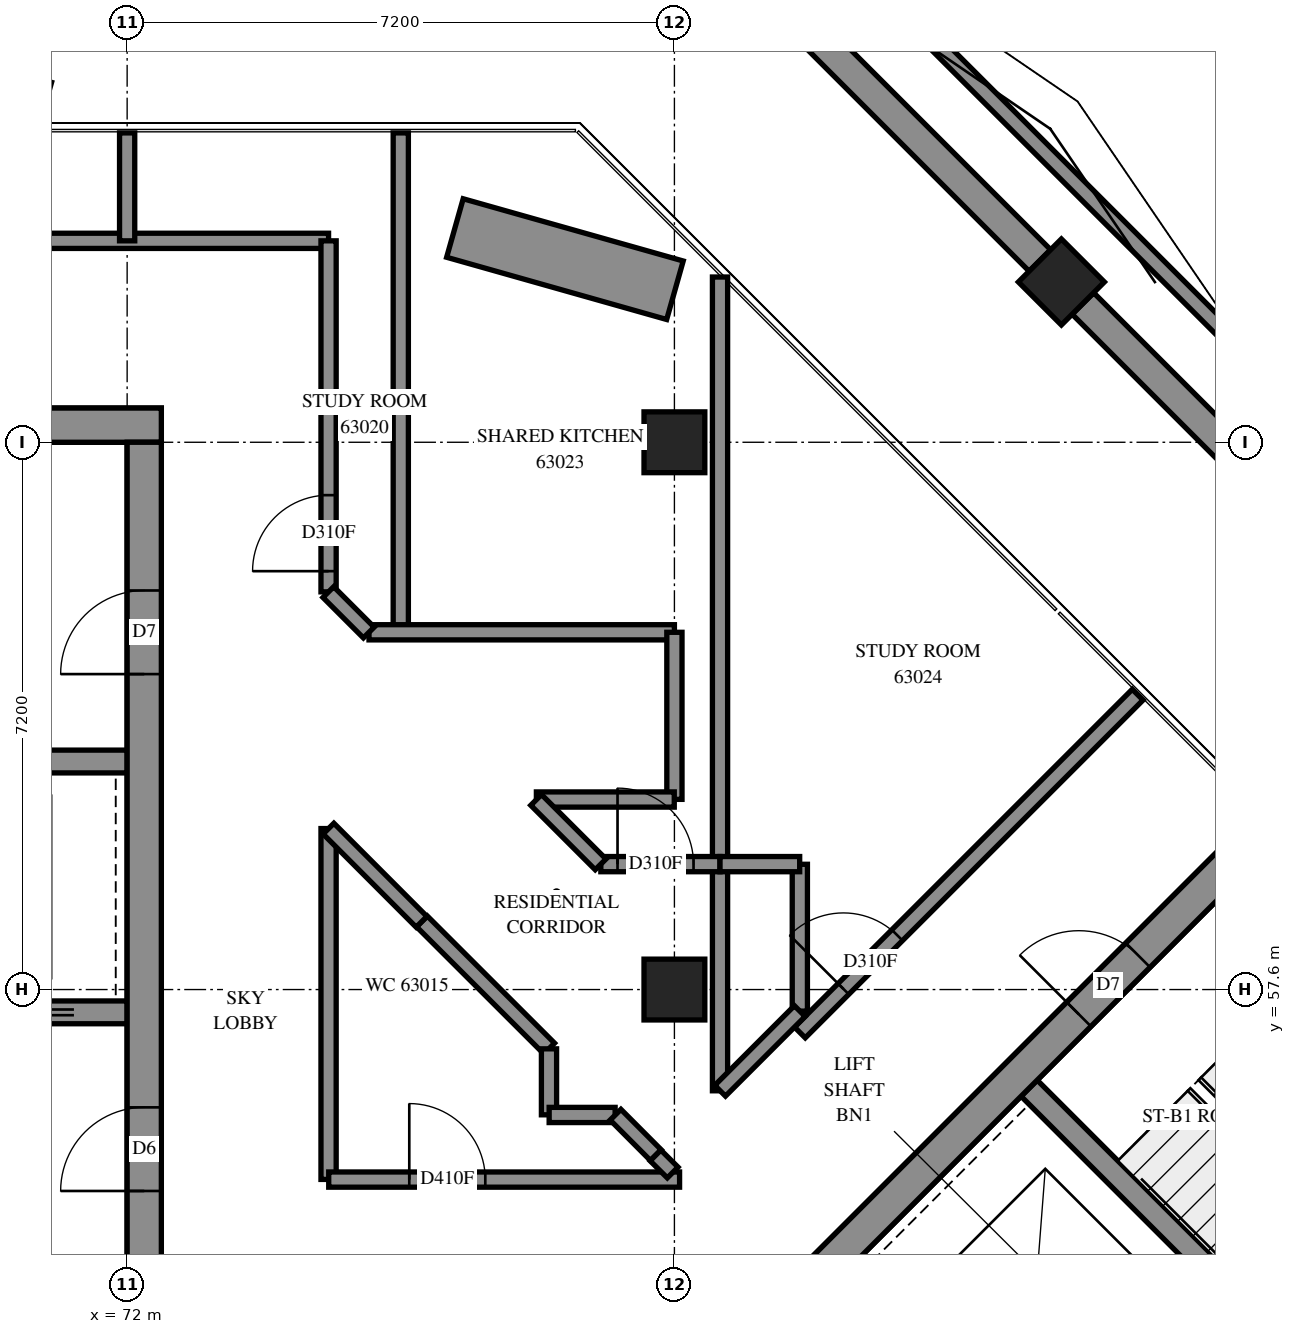
"""IFC4 building model, lengths in metres.
Left out: names, types, materials, properties, quantities, classifications, styles, units other than length and angle.
Written with IfcOpenShell. Run it as: python <this file> out.ifc"""

import sys

from ifc_helpers import new_model, si_unit, direction, frame, frame_2d, origin, origin_2d, place, context, subcontext, project, spatial, polyline, rectangle, outline, extrude, element, fill, save


model = new_model("IFC4")
c1 = context("Model", 3, precision=1e-05, world=origin(), true_north=direction((0.0, 1.0)))
c2 = subcontext(c1, "Body", "Model", "MODEL_VIEW")
j1 = project(units=[si_unit("LENGTHUNIT", "METRE"), si_unit("PLANEANGLEUNIT", "RADIAN")], contexts=[c1])
p1 = place(None, origin())
s1 = spatial("IfcSite", under=j1, at=p1, CompositionType="ELEMENT")
p2 = place(p1, origin())
s2 = spatial("IfcBuilding", under=s1, at=p2, CompositionType="ELEMENT")
p3 = place(p2, frame((0.0, 0.0, 230.4)))
s3 = spatial("IfcBuildingStorey", under=s2, at=p3, CompositionType="ELEMENT", Elevation=230.4)
for number, where, z_axis, x_axis in (
    (1, (79.2, 57.6, 0.0), (0.0, 0.0, 1.0), (1.0, 0.0, 0.0)),
    (2, (79.2, 64.8, 0.0), (0.0, 0.0, 1.0), (1.0, 0.0, 0.0)),
    (3, (84.291, 66.909, 0.0), (0.0, 0.0, 1.0), (0.707, -0.707, 0.0)),
):
    element("IfcColumn", number, at=place(p3, frame(where, z_axis=z_axis, x_axis=x_axis)), inside=s3, PredefinedType="COLUMN", context=c2, shape_type="SweptSolid", body=[
        extrude(rectangle(XDim=0.8, YDim=0.8, at=origin_2d()), origin(), (0.0, 0.0, 1.0), 3.9),
    ])
p4 = place(p3, frame((57.15, 65.025, -0.3), z_axis=(0.0, 0.0, 1.0), x_axis=(1.0, 0.0, 0.0)))
e4 = element("IfcWall", 4, at=p4, inside=s3, PredefinedType="SHEAR", context=c2, shape_type="SweptSolid", body=[
    extrude(rectangle(XDim=15.3, YDim=0.45, at=frame_2d((7.65, 0.0))), origin(), (0.0, 0.0, 1.0), 3.5),
])
p5 = place(p4, frame((10.45, 0.0, 0.3)))
e5 = element("IfcOpeningElement", 5, at=p5, cuts=e4, PredefinedType="OPENING", context=c2, shape_type="SweptSolid", body=[
    extrude(rectangle(XDim=0.8, YDim=2.1, at=frame_2d((0.4, 1.05))), frame((0.0, 0.235, 0.0), z_axis=(0.0, -1.0, 0.0), x_axis=(1.0, 0.0, 0.0)), (0.0, 0.0, 1.0), 0.47),
])
p6 = place(p3, frame((72.225, 50.4, -0.3), z_axis=(0.0, 0.0, 1.0), x_axis=(0.0, 1.0, 0.0)))
e6 = element("IfcWall", 6, at=p6, inside=s3, PredefinedType="SHEAR", context=c2, shape_type="SweptSolid", body=[
    extrude(rectangle(XDim=14.4, YDim=0.45, at=frame_2d((7.2, 0.0))), origin(), (0.0, 0.0, 1.0), 3.5),
])
p7 = place(p6, frame((4.55, 0.0, 0.3)))
e7 = element("IfcOpeningElement", 7, at=p7, cuts=e6, PredefinedType="OPENING", context=c2, shape_type="SweptSolid", body=[
    extrude(rectangle(XDim=1.1, YDim=2.1, at=frame_2d((0.55, 1.05))), frame((0.0, 0.235, 0.0), z_axis=(0.0, -1.0, 0.0), x_axis=(1.0, 0.0, 0.0)), (0.0, 0.0, 1.0), 0.47),
])
p8 = place(p6, frame((11.35, 0.0, 0.3)))
e8 = element("IfcOpeningElement", 8, at=p8, cuts=e6, PredefinedType="OPENING", context=c2, shape_type="SweptSolid", body=[
    extrude(rectangle(XDim=1.1, YDim=2.1, at=frame_2d((0.55, 1.05))), frame((0.0, 0.235, 0.0), z_axis=(0.0, -1.0, 0.0), x_axis=(1.0, 0.0, 0.0)), (0.0, 0.0, 1.0), 0.47),
])
p9 = place(p3, frame((57.6, 57.3, 0.0), z_axis=(0.0, 0.0, 1.0), x_axis=(1.0, 0.0, 0.0)))
e9 = element("IfcWall", 9, at=p9, inside=s3, PredefinedType="SOLIDWALL", context=c2, shape_type="SweptSolid", body=[
    extrude(rectangle(XDim=14.4, YDim=0.3, at=frame_2d((7.2, 0.0))), origin(), (0.0, 0.0, 1.0), 3.9),
])
p10 = place(p9, frame((1.25, 0.0, 0.0)))
e10 = element("IfcOpeningElement", 10, at=p10, cuts=e9, PredefinedType="OPENING", context=c2, shape_type="SweptSolid", body=[
    extrude(rectangle(XDim=1.1, YDim=2.1, at=frame_2d((0.55, 1.05))), frame((0.0, 0.16, 0.0), z_axis=(0.0, -1.0, 0.0), x_axis=(1.0, 0.0, 0.0)), (0.0, 0.0, 1.0), 0.32),
])
p11 = place(p9, frame((4.85, 0.0, 0.0)))
e11 = element("IfcOpeningElement", 11, at=p11, cuts=e9, PredefinedType="OPENING", context=c2, shape_type="SweptSolid", body=[
    extrude(rectangle(XDim=1.1, YDim=2.1, at=frame_2d((0.55, 1.05))), frame((0.0, 0.16, 0.0), z_axis=(0.0, -1.0, 0.0), x_axis=(1.0, 0.0, 0.0)), (0.0, 0.0, 1.0), 0.32),
])
p12 = place(p9, frame((8.45, 0.0, 0.0)))
e12 = element("IfcOpeningElement", 12, at=p12, cuts=e9, PredefinedType="OPENING", context=c2, shape_type="SweptSolid", body=[
    extrude(rectangle(XDim=1.1, YDim=2.1, at=frame_2d((0.55, 1.05))), frame((0.0, 0.16, 0.0), z_axis=(0.0, -1.0, 0.0), x_axis=(1.0, 0.0, 0.0)), (0.0, 0.0, 1.0), 0.32),
])
p13 = place(p9, frame((12.05, 0.0, 0.0)))
e13 = element("IfcOpeningElement", 13, at=p13, cuts=e9, PredefinedType="OPENING", context=c2, shape_type="SweptSolid", body=[
    extrude(rectangle(XDim=1.1, YDim=2.1, at=frame_2d((0.55, 1.05))), frame((0.0, 0.16, 0.0), z_axis=(0.0, -1.0, 0.0), x_axis=(1.0, 0.0, 0.0)), (0.0, 0.0, 1.0), 0.32),
])
p14 = place(p3, frame((64.8, 60.6, 0.0), z_axis=(0.0, 0.0, 1.0), x_axis=(1.0, 0.0, 0.0)))
e14 = element("IfcWall", 14, at=p14, inside=s3, PredefinedType="SOLIDWALL", context=c2, shape_type="SweptSolid", body=[
    extrude(rectangle(XDim=7.2, YDim=0.3, at=frame_2d((3.6, 0.0))), origin(), (0.0, 0.0, 1.0), 3.9),
])
p15 = place(p3, frame((76.495, 49.249, -0.3), z_axis=(0.0, 0.0, 1.0), x_axis=(0.7071067812, 0.7071067812, 0.0)))
e15 = element("IfcWall", 15, at=p15, inside=s3, PredefinedType="SHEAR", context=c2, shape_type="SweptSolid", body=[
    extrude(rectangle(XDim=14.4, YDim=0.45, at=frame_2d((7.2, 0.0))), origin(), (0.0, 0.0, 1.0), 3.5),
])
p16 = place(p15, frame((4.55, 0.0, 0.3)))
e16 = element("IfcOpeningElement", 16, at=p16, cuts=e15, PredefinedType="OPENING", context=c2, shape_type="SweptSolid", body=[
    extrude(rectangle(XDim=1.1, YDim=2.1, at=frame_2d((0.55, 1.05))), frame((0.0, 0.235, 0.0), z_axis=(0.0, -1.0, 0.0), x_axis=(1.0, 0.0, 0.0)), (0.0, 0.0, 1.0), 0.47),
])
p17 = place(p15, frame((11.35, 0.0, 0.3)))
e17 = element("IfcOpeningElement", 17, at=p17, cuts=e15, PredefinedType="OPENING", context=c2, shape_type="SweptSolid", body=[
    extrude(rectangle(XDim=1.1, YDim=2.1, at=frame_2d((0.55, 1.05))), frame((0.0, 0.235, 0.0), z_axis=(0.0, -1.0, 0.0), x_axis=(1.0, 0.0, 0.0)), (0.0, 0.0, 1.0), 0.47),
])
p18 = place(p3, frame((83.867, 56.302, 0.0), z_axis=(0.0, 0.0, 1.0), x_axis=(0.7071137256, -0.7070998367, 0.0)))
e18 = element("IfcWall", 18, at=p18, inside=s3, PredefinedType="SOLIDWALL", context=c2, shape_type="SweptSolid", body=[
    extrude(rectangle(XDim=7.2, YDim=0.3, at=frame_2d((3.6, 0.0))), origin(), (0.0, 0.0, 1.0), 3.9),
])
p19 = place(p3, frame((79.207, 66.8, 0.0), z_axis=(0.0, 0.0, 1.0), x_axis=(-0.9622630537, 0.2721209575, 0.0)))
e19 = element("IfcWall", 19, at=p19, inside=s3, PredefinedType="SOLIDWALL", context=c2, shape_type="SweptSolid", body=[
    extrude(rectangle(XDim=3.008, YDim=0.8, at=frame_2d((1.504, 0.0))), origin(), (0.0, 0.0, 1.0), 0.65),
])
p20 = place(p3, frame((102.747, 49.938, 0.0), z_axis=(0.0, 0.0, 1.0), x_axis=(-0.7071083109, 0.7071052514, 0.0)))
e20 = element("IfcWall", 20, at=p20, inside=s3, PredefinedType="SOLIDWALL", context=c2, shape_type="SweptSolid", body=[
    extrude(outline(polyline([(-0.1, -0.1), (32.726, -0.1), (32.644, 0.1), (0.1, 0.1), (-0.1, -0.1)])), origin(), (0.0, 0.0, 1.0), 4.2),
])
p21 = place(p3, frame((54.95, 67.45, 0.0), z_axis=(0.0, 0.0, 1.0), x_axis=(1.0, 0.0, 0.0)))
e21 = element("IfcWall", 21, at=p21, inside=s3, PredefinedType="PARTITIONING", context=c2, shape_type="SweptSolid", body=[
    extrude(rectangle(XDim=19.7, YDim=0.2, at=frame_2d((9.85, 0.0))), origin(), (0.0, 0.0, 1.0), 3.9),
])
p22 = place(p21, frame((6.513, 0.0, 0.0)))
e22 = element("IfcOpeningElement", 22, at=p22, cuts=e21, PredefinedType="OPENING", context=c2, shape_type="SweptSolid", body=[
    extrude(rectangle(XDim=1.0, YDim=2.1, at=frame_2d((0.5, 1.05))), frame((0.0, 0.11, 0.0), z_axis=(0.0, -1.0, 0.0), x_axis=(1.0, 0.0, 0.0)), (0.0, 0.0, 1.0), 0.22),
])
p23 = place(p21, frame((13.713, 0.0, 0.0)))
e23 = element("IfcOpeningElement", 23, at=p23, cuts=e21, PredefinedType="OPENING", context=c2, shape_type="SweptSolid", body=[
    extrude(rectangle(XDim=1.0, YDim=2.1, at=frame_2d((0.5, 1.05))), frame((0.0, 0.11, 0.0), z_axis=(0.0, -1.0, 0.0), x_axis=(1.0, 0.0, 0.0)), (0.0, 0.0, 1.0), 0.22),
])
p24 = place(p3, frame((79.8, 59.25, 0.0), z_axis=(0.0, 0.0, 1.0), x_axis=(0.0, 1.0, 0.0)))
e24 = element("IfcWall", 24, at=p24, inside=s3, PredefinedType="PARTITIONING", context=c2, shape_type="SweptSolid", body=[
    extrude(rectangle(XDim=7.724, YDim=0.2, at=frame_2d((3.862, 0.0))), origin(), (0.0, 0.0, 1.0), 3.9),
])
p25 = place(p3, frame((75.6, 62.3, 0.0), z_axis=(0.0, 0.0, 1.0), x_axis=(0.0, 1.0, 0.0)))
e25 = element("IfcWall", 25, at=p25, inside=s3, PredefinedType="PARTITIONING", context=c2, shape_type="SweptSolid", body=[
    extrude(rectangle(XDim=6.57, YDim=0.2, at=frame_2d((3.285, 0.0))), origin(), (0.0, 0.0, 1.0), 3.9),
])
p26 = place(p3, frame((80.851, 57.035, 0.0), z_axis=(0.0, 0.0, 1.0), x_axis=(0.7071067812, 0.7071067812, 0.0)))
e26 = element("IfcWall", 26, at=p26, inside=s3, PredefinedType="PARTITIONING", context=c2, shape_type="SweptSolid", body=[
    extrude(rectangle(XDim=6.285, YDim=0.2, at=frame_2d((3.142, 0.0))), origin(), (0.0, 0.0, 1.0), 3.9),
])
p27 = place(p26, frame((0.81, 0.0, 0.0)))
e27 = element("IfcOpeningElement", 27, at=p27, cuts=e26, PredefinedType="OPENING", context=c2, shape_type="SweptSolid", body=[
    extrude(rectangle(XDim=1.0, YDim=2.1, at=frame_2d((0.5, 1.05))), frame((0.0, 0.11, 0.0), z_axis=(0.0, -1.0, 0.0), x_axis=(1.0, 0.0, 0.0)), (0.0, 0.0, 1.0), 0.22),
])
p28 = place(p3, frame((74.65, 62.832, 0.0), z_axis=(0.0, 0.0, 1.0), x_axis=(0.0, 1.0, 0.0)))
e28 = element("IfcWall", 28, at=p28, inside=s3, PredefinedType="PARTITIONING", context=c2, shape_type="SweptSolid", body=[
    extrude(rectangle(XDim=4.618, YDim=0.2, at=frame_2d((2.309, 0.0))), origin(), (0.0, 0.0, 1.0), 3.9),
])
p29 = place(p28, frame((0.272, 0.0, 0.0)))
e29 = element("IfcOpeningElement", 29, at=p29, cuts=e28, PredefinedType="OPENING", context=c2, shape_type="SweptSolid", body=[
    extrude(rectangle(XDim=1.0, YDim=2.1, at=frame_2d((0.5, 1.05))), frame((0.0, 0.11, 0.0), z_axis=(0.0, -1.0, 0.0), x_axis=(1.0, 0.0, 0.0)), (0.0, 0.0, 1.0), 0.22),
])
p30 = place(p3, frame((74.65, 55.102, 0.0), z_axis=(0.0, 0.0, 1.0), x_axis=(0.0, 1.0, 0.0)))
e30 = element("IfcWall", 30, at=p30, inside=s3, PredefinedType="PARTITIONING", context=c2, shape_type="SweptSolid", body=[
    extrude(rectangle(XDim=4.616, YDim=0.2, at=frame_2d((2.308, 0.0))), origin(), (0.0, 0.0, 1.0), 3.9),
])
p31 = place(p3, frame((74.652, 55.1, 0.0), z_axis=(0.0, 0.0, 1.0), x_axis=(1.0, 0.0, 0.0)))
e31 = element("IfcWall", 31, at=p31, inside=s3, PredefinedType="PARTITIONING", context=c2, shape_type="SweptSolid", body=[
    extrude(rectangle(XDim=4.616, YDim=0.2, at=frame_2d((2.308, 0.0))), origin(), (0.0, 0.0, 1.0), 3.9),
])
p32 = place(p31, frame((1.06, 0.0, 0.0)))
e32 = element("IfcOpeningElement", 32, at=p32, cuts=e31, PredefinedType="OPENING", context=c2, shape_type="SweptSolid", body=[
    extrude(rectangle(XDim=1.0, YDim=2.1, at=frame_2d((0.5, 1.05))), frame((0.0, 0.11, 0.0), z_axis=(0.0, -1.0, 0.0), x_axis=(1.0, 0.0, 0.0)), (0.0, 0.0, 1.0), 0.22),
])
p33 = place(p3, frame((75.182, 62.3, 0.0), z_axis=(0.0, 0.0, 1.0), x_axis=(1.0, 0.0, 0.0)))
e33 = element("IfcWall", 33, at=p33, inside=s3, PredefinedType="PARTITIONING", context=c2, shape_type="SweptSolid", body=[
    extrude(rectangle(XDim=4.018, YDim=0.2, at=frame_2d((2.009, 0.0))), origin(), (0.0, 0.0, 1.0), 3.9),
])
p34 = place(p3, frame((79.8, 56.268, 0.0), z_axis=(0.0, 0.0, 1.0), x_axis=(0.0, 1.0, 0.0)))
e34 = element("IfcWall", 34, at=p34, inside=s3, PredefinedType="PARTITIONING", context=c2, shape_type="SweptSolid", body=[
    extrude(rectangle(XDim=2.982, YDim=0.2, at=frame_2d((1.491, 0.0))), origin(), (0.0, 0.0, 1.0), 3.9),
])
p35 = place(p3, frame((75.878, 58.496, 0.0), z_axis=(0.0, 0.0, 1.0), x_axis=(0.7075293128, -0.706683997, 0.0)))
e35 = element("IfcWall", 35, at=p35, inside=s3, PredefinedType="PARTITIONING", context=c2, shape_type="SweptSolid", body=[
    extrude(rectangle(XDim=2.366, YDim=0.2, at=frame_2d((1.183, 0.0))), origin(), (0.0, 0.0, 1.0), 3.9),
])
p36 = place(p3, frame((79.2, 60.102, 0.0), z_axis=(0.0, 0.0, 1.0), x_axis=(0.0, 1.0, 0.0)))
e36 = element("IfcWall", 36, at=p36, inside=s3, PredefinedType="PARTITIONING", context=c2, shape_type="SweptSolid", body=[
    extrude(rectangle(XDim=2.198, YDim=0.2, at=frame_2d((1.099, 0.0))), origin(), (0.0, 0.0, 1.0), 3.9),
])
p37 = place(p3, frame((80.85, 57.316, 0.0), z_axis=(0.0, 0.0, 1.0), x_axis=(0.0, 1.0, 0.0)))
e37 = element("IfcWall", 37, at=p37, inside=s3, PredefinedType="PARTITIONING", context=c2, shape_type="SweptSolid", body=[
    extrude(rectangle(XDim=1.932, YDim=0.2, at=frame_2d((0.966, 0.0))), origin(), (0.0, 0.0, 1.0), 3.9),
])
p38 = place(p3, frame((77.384, 60.1, 0.0), z_axis=(0.0, 0.0, 1.0), x_axis=(1.0, 0.0, 0.0)))
e38 = element("IfcWall", 38, at=p38, inside=s3, PredefinedType="PARTITIONING", context=c2, shape_type="SweptSolid", body=[
    extrude(rectangle(XDim=1.814, YDim=0.2, at=frame_2d((0.907, 0.0))), origin(), (0.0, 0.0, 1.0), 3.9),
])
p39 = place(p3, frame((74.649, 59.717, 0.0), z_axis=(0.0, 0.0, 1.0), x_axis=(0.7065293157, -0.7076837754, 0.0)))
e39 = element("IfcWall", 39, at=p39, inside=s3, PredefinedType="PARTITIONING", context=c2, shape_type="SweptSolid", body=[
    extrude(rectangle(XDim=1.732, YDim=0.2, at=frame_2d((0.866, 0.0))), origin(), (0.0, 0.0, 1.0), 3.9),
])
p40 = place(p3, frame((78.232, 59.25, 0.0), z_axis=(0.0, 0.0, 1.0), x_axis=(1.0, 0.0, 0.0)))
e40 = element("IfcWall", 40, at=p40, inside=s3, PredefinedType="PARTITIONING", context=c2, shape_type="SweptSolid", body=[
    extrude(rectangle(XDim=1.568, YDim=0.2, at=frame_2d((0.784, 0.0))), origin(), (0.0, 0.0, 1.0), 3.9),
])
p41 = place(p40, frame((0.22, 0.0, 0.0)))
e41 = element("IfcOpeningElement", 41, at=p41, cuts=e40, PredefinedType="OPENING", context=c2, shape_type="SweptSolid", body=[
    extrude(rectangle(XDim=1.0, YDim=2.1, at=frame_2d((0.5, 1.05))), frame((0.0, 0.11, 0.0), z_axis=(0.0, -1.0, 0.0), x_axis=(1.0, 0.0, 0.0)), (0.0, 0.0, 1.0), 0.22),
])
p42 = place(p3, frame((79.801, 56.269, 0.0), z_axis=(0.0, 0.0, 1.0), x_axis=(0.7071067812, 0.7071067812, 0.0)))
e42 = element("IfcWall", 42, at=p42, inside=s3, PredefinedType="PARTITIONING", context=c2, shape_type="SweptSolid", body=[
    extrude(rectangle(XDim=1.482, YDim=0.2, at=frame_2d((0.741, 0.0))), origin(), (0.0, 0.0, 1.0), 3.9),
])
p43 = place(p3, frame((72.0, 67.45, 0.0), z_axis=(0.0, 0.0, 1.0), x_axis=(0.0, 1.0, 0.0)))
e43 = element("IfcWall", 43, at=p43, inside=s3, PredefinedType="PARTITIONING", context=c2, shape_type="SweptSolid", body=[
    extrude(rectangle(XDim=1.42, YDim=0.2, at=frame_2d((0.71, 0.0))), origin(), (0.0, 0.0, 1.0), 3.9),
])
p44 = place(p3, frame((77.381, 60.095, 0.0), z_axis=(0.0, 0.0, 1.0), x_axis=(0.7071067812, -0.7071067812, 0.0)))
e44 = element("IfcWall", 44, at=p44, inside=s3, PredefinedType="PARTITIONING", context=c2, shape_type="SweptSolid", body=[
    extrude(rectangle(XDim=1.199, YDim=0.2, at=frame_2d((0.6, 0.0))), origin(), (0.0, 0.0, 1.0), 3.9),
])
p45 = place(p3, frame((79.8, 59.25, 0.0), z_axis=(0.0, 0.0, 1.0), x_axis=(1.0, 0.0, 0.0)))
e45 = element("IfcWall", 45, at=p45, inside=s3, PredefinedType="PARTITIONING", context=c2, shape_type="SweptSolid", body=[
    extrude(rectangle(XDim=1.048, YDim=0.2, at=frame_2d((0.524, 0.0))), origin(), (0.0, 0.0, 1.0), 3.9),
])
for number, where, z_axis, x_axis in (
    (46, (77.55, 55.952, 0.0), (0.0, 0.0, 1.0), (0.0, 1.0, 0.0)),
    (47, (77.552, 55.95, 0.0), (0.0, 0.0, 1.0), (1.0, 0.0, 0.0)),
):
    element("IfcWall", number, at=place(p3, frame(where, z_axis=z_axis, x_axis=x_axis)), inside=s3, PredefinedType="PARTITIONING", context=c2, shape_type="SweptSolid", body=[
        extrude(rectangle(XDim=0.868, YDim=0.2, at=frame_2d((0.434, 0.0))), origin(), (0.0, 0.0, 1.0), 3.9),
    ])
p46 = place(p3, frame((74.647, 62.829, 0.0), z_axis=(0.0, 0.0, 1.0), x_axis=(0.7071067812, -0.7071067812, 0.0)))
e48 = element("IfcWall", 48, at=p46, inside=s3, PredefinedType="PARTITIONING", context=c2, shape_type="SweptSolid", body=[
    extrude(rectangle(XDim=0.752, YDim=0.2, at=frame_2d((0.376, 0.0))), origin(), (0.0, 0.0, 1.0), 3.9),
])
p47 = place(p3, frame((78.425, 55.953, 0.0), z_axis=(0.0, 0.0, 1.0), x_axis=(0.7057738785, -0.7084371761, 0.0)))
e49 = element("IfcWall", 49, at=p47, inside=s3, PredefinedType="PARTITIONING", context=c2, shape_type="SweptSolid", body=[
    extrude(rectangle(XDim=0.751, YDim=0.2, at=frame_2d((0.376, 0.0))), origin(), (0.0, 0.0, 1.0), 3.9),
])
p48 = place(p3, frame((78.951, 55.417, 0.0), z_axis=(0.0, 0.0, 1.0), x_axis=(0.709302262, -0.7049044624, 0.0)))
e50 = element("IfcWall", 50, at=p48, inside=s3, PredefinedType="PARTITIONING", context=c2, shape_type="SweptSolid", body=[
    extrude(rectangle(XDim=0.318, YDim=0.2, at=frame_2d((0.159, 0.0))), origin(), (0.0, 0.0, 1.0), 3.9),
])
p49 = place(p7, origin())
e51 = element("IfcDoor", 51, at=p49, inside=s3, OperationType="DOUBLE_DOOR_SINGLE_SWING", PredefinedType="DOOR", context=c2, shape_type="SweptSolid", body=[
    extrude(rectangle(XDim=1.1, YDim=2.1, at=frame_2d((0.55, 1.05))), frame((0.0, 0.025, 0.0), z_axis=(0.0, -1.0, 0.0), x_axis=(1.0, 0.0, 0.0)), (0.0, 0.0, 1.0), 0.05),
])
fill(e7, e51)
p50 = place(p8, origin())
e52 = element("IfcDoor", 52, at=p50, inside=s3, OperationType="SINGLE_SWING_RIGHT", PredefinedType="DOOR", context=c2, shape_type="SweptSolid", body=[
    extrude(rectangle(XDim=1.1, YDim=2.1, at=frame_2d((0.55, 1.05))), frame((0.0, 0.025, 0.0), z_axis=(0.0, -1.0, 0.0), x_axis=(1.0, 0.0, 0.0)), (0.0, 0.0, 1.0), 0.05),
])
fill(e8, e52)
p51 = place(p17, origin())
e53 = element("IfcDoor", 53, at=p51, inside=s3, OperationType="SINGLE_SWING_LEFT", PredefinedType="DOOR", context=c2, shape_type="SweptSolid", body=[
    extrude(rectangle(XDim=1.1, YDim=2.1, at=frame_2d((0.55, 1.05))), frame((0.0, 0.025, 0.0), z_axis=(0.0, -1.0, 0.0), x_axis=(1.0, 0.0, 0.0)), (0.0, 0.0, 1.0), 0.05),
])
fill(e17, e53)
p52 = place(p32, origin())
e54 = element("IfcDoor", 54, at=p52, inside=s3, OperationType="SINGLE_SWING_LEFT", PredefinedType="DOOR", context=c2, shape_type="SweptSolid", body=[
    extrude(rectangle(XDim=1.0, YDim=2.1, at=frame_2d((0.5, 1.05))), frame((0.0, 0.025, 0.0), z_axis=(0.0, -1.0, 0.0), x_axis=(1.0, 0.0, 0.0)), (0.0, 0.0, 1.0), 0.05),
])
fill(e32, e54)
p53 = place(p29, origin())
e55 = element("IfcDoor", 55, at=p53, inside=s3, OperationType="SINGLE_SWING_RIGHT", PredefinedType="DOOR", context=c2, shape_type="SweptSolid", body=[
    extrude(rectangle(XDim=1.0, YDim=2.1, at=frame_2d((0.5, 1.05))), frame((0.0, 0.025, 0.0), z_axis=(0.0, -1.0, 0.0), x_axis=(1.0, 0.0, 0.0)), (0.0, 0.0, 1.0), 0.05),
])
fill(e29, e55)
p54 = place(p41, origin())
e56 = element("IfcDoor", 56, at=p54, inside=s3, OperationType="SINGLE_SWING_LEFT", PredefinedType="DOOR", context=c2, shape_type="SweptSolid", body=[
    extrude(rectangle(XDim=1.0, YDim=2.1, at=frame_2d((0.5, 1.05))), frame((0.0, 0.025, 0.0), z_axis=(0.0, -1.0, 0.0), x_axis=(1.0, 0.0, 0.0)), (0.0, 0.0, 1.0), 0.05),
])
fill(e41, e56)
p55 = place(p27, origin())
e57 = element("IfcDoor", 57, at=p55, inside=s3, OperationType="SINGLE_SWING_RIGHT", PredefinedType="DOOR", context=c2, shape_type="SweptSolid", body=[
    extrude(rectangle(XDim=1.0, YDim=2.1, at=frame_2d((0.5, 1.05))), frame((0.0, 0.025, 0.0), z_axis=(0.0, -1.0, 0.0), x_axis=(1.0, 0.0, 0.0)), (0.0, 0.0, 1.0), 0.05),
])
fill(e27, e57)
save(model, sys.argv[1])
